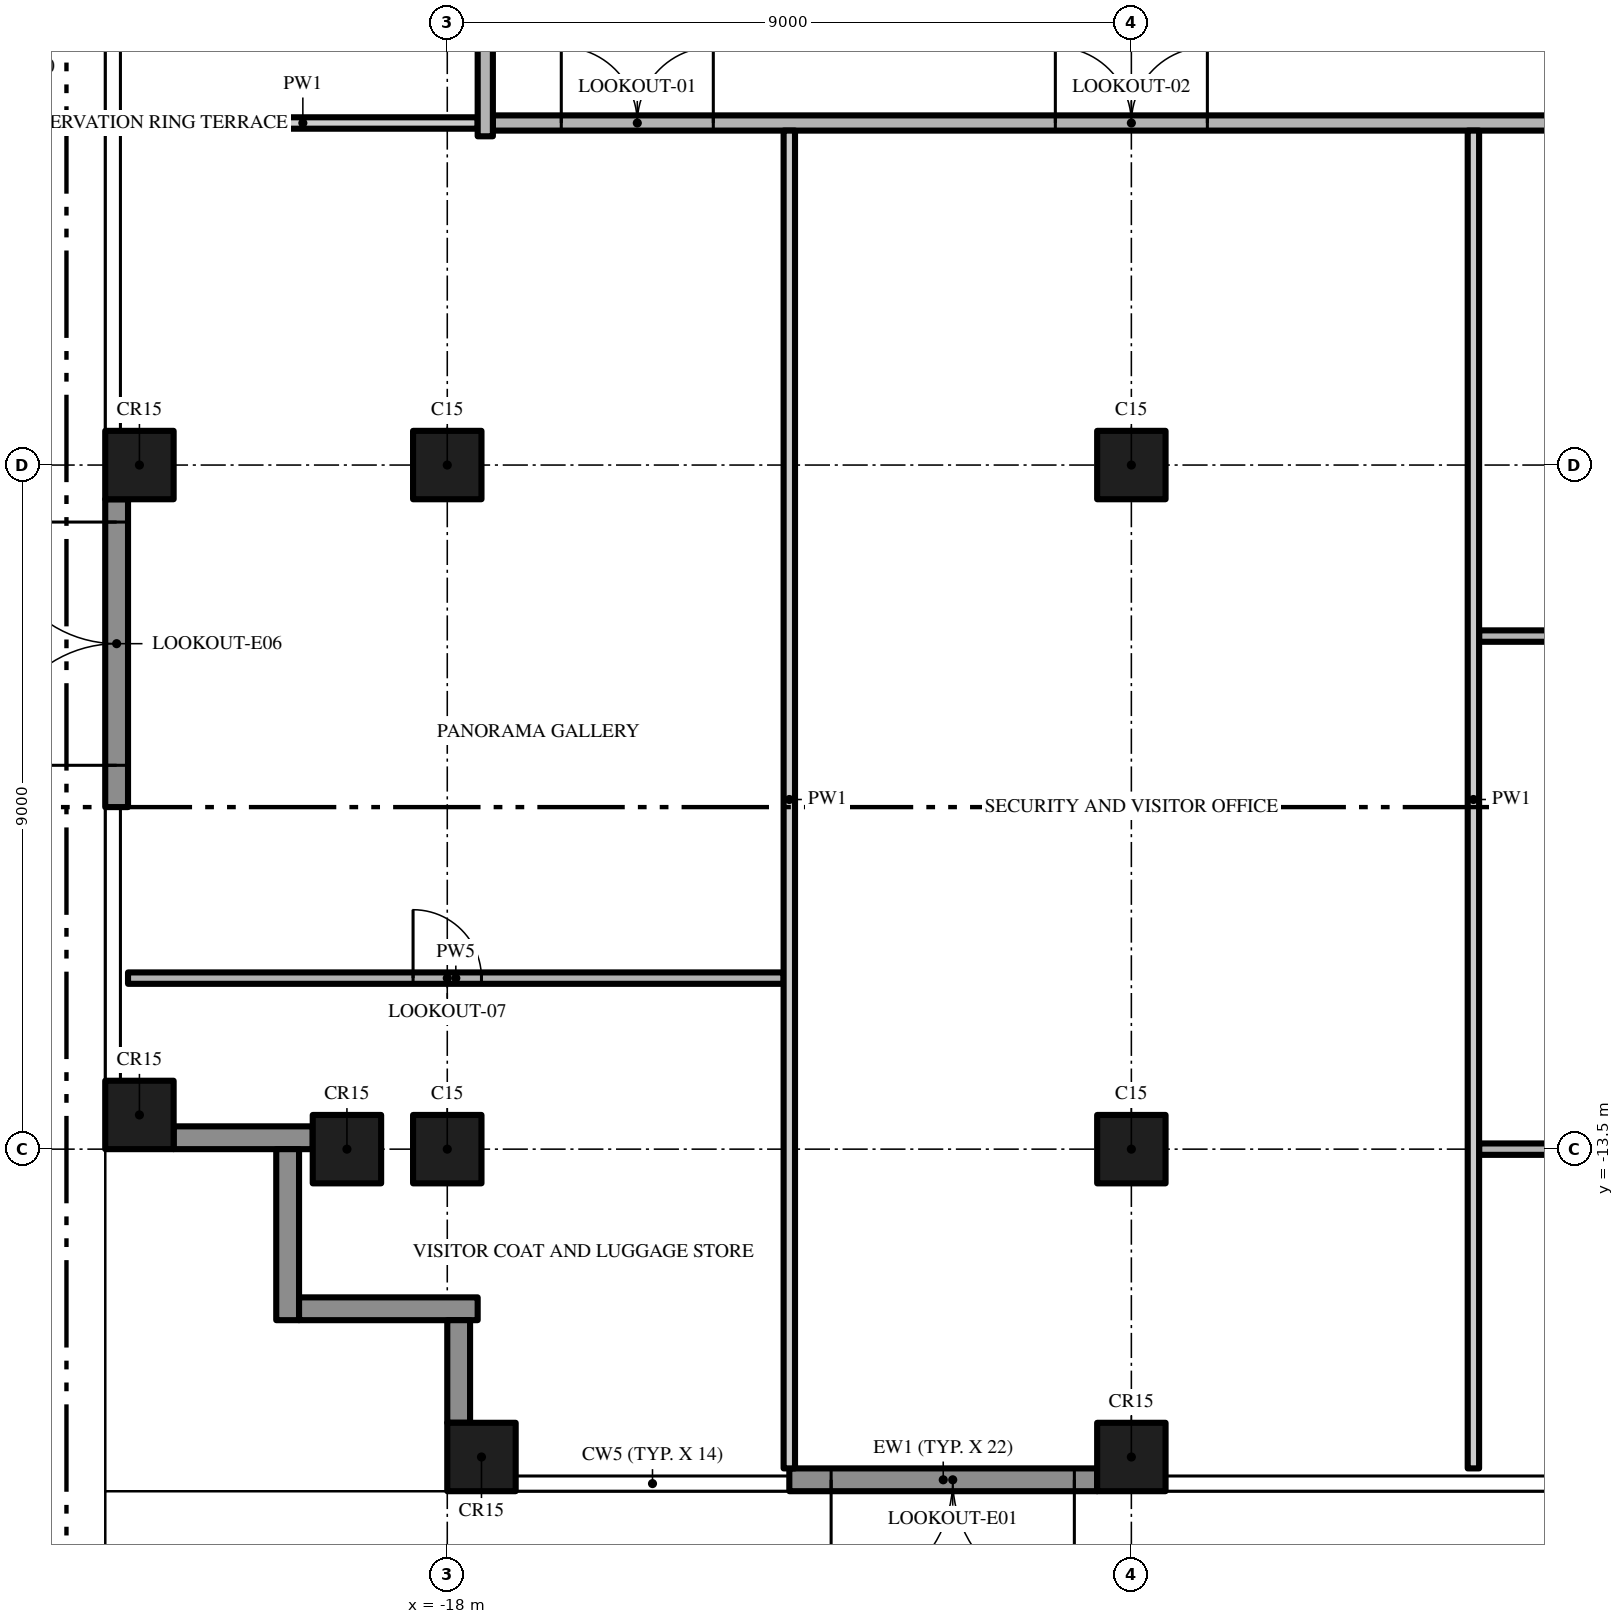
"""IFC4 building model, lengths in metres.
Left out: names, types, materials, properties, quantities, classifications, styles, units other than length and angle.
Written with IfcOpenShell. Run it as: python <this file> out.ifc"""

import sys

from ifc_helpers import new_model, si_unit, direction, frame, frame_2d, origin, origin_2d, place, context, subcontext, project, spatial, rectangle, extrude, element, fill, save


model = new_model("IFC4")
c1 = context("Model", 3, precision=1e-05, world=origin(), true_north=direction((0.0, 1.0)))
c2 = subcontext(c1, "Body", "Model", "MODEL_VIEW")
j1 = project(units=[si_unit("LENGTHUNIT", "METRE"), si_unit("PLANEANGLEUNIT", "RADIAN")], contexts=[c1])
p1 = place(None, origin())
s1 = spatial("IfcSite", under=j1, at=p1, CompositionType="ELEMENT")
p2 = place(p1, origin())
s2 = spatial("IfcBuilding", under=s1, at=p2, CompositionType="ELEMENT")
p3 = place(p2, frame((0.0, 0.0, 297.4)))
s3 = spatial("IfcBuildingStorey", under=s2, at=p3, CompositionType="ELEMENT", Elevation=297.4)
for number, where, z_axis, x_axis in (
    (1, (-18.0, -13.5, 0.0), (0.0, 0.0, 1.0), (1.0, 0.0, 0.0)),
    (2, (-17.55, -17.55, 0.0), (0.0, 0.0, 1.0), (1.0, 0.0, 0.0)),
    (3, (-18.0, -4.5, 0.0), (0.0, 0.0, 1.0), (1.0, 0.0, 0.0)),
    (4, (-22.05, -13.05, 0.0), (0.0, 0.0, 1.0), (1.0, 0.0, 0.0)),
    (5, (-19.32, -13.5, 0.0), (0.0, 0.0, 1.0), (1.0, 0.0, 0.0)),
    (6, (-22.05, -4.5, 0.0), (0.0, 0.0, 1.0), (1.0, 0.0, 0.0)),
    (7, (-9.0, -13.5, 0.0), (0.0, 0.0, 1.0), (1.0, 0.0, 0.0)),
    (8, (-9.0, -17.55, 0.0), (0.0, 0.0, 1.0), (1.0, 0.0, 0.0)),
    (9, (-9.0, -4.5, 0.0), (0.0, 0.0, 1.0), (1.0, 0.0, 0.0)),
):
    element("IfcColumn", number, at=place(p3, frame(where, z_axis=z_axis, x_axis=x_axis)), inside=s3, PredefinedType="COLUMN", context=c2, shape_type="SweptSolid", body=[
        extrude(rectangle(XDim=0.9, YDim=0.9, at=origin_2d()), origin(), (0.0, 0.0, 1.0), 5.65),
    ])
p4 = place(p3, frame((-9.45, -17.85, 0.0), z_axis=(0.0, 0.0, 1.0), x_axis=(-1.0, 0.0, 0.0)))
e10 = element("IfcWall", 10, at=p4, inside=s3, PredefinedType="SOLIDWALL", context=c2, shape_type="SweptSolid", body=[
    extrude(rectangle(XDim=4.05, YDim=0.3, at=frame_2d((2.025, 0.0))), origin(), (0.0, 0.0, 1.0), 5.65),
])
p5 = place(p4, frame((0.3, 0.0, 0.0)))
e11 = element("IfcOpeningElement", 11, at=p5, cuts=e10, PredefinedType="OPENING", context=c2, shape_type="SweptSolid", body=[
    extrude(rectangle(XDim=3.2, YDim=2.4, at=frame_2d((1.6, 1.2))), frame((0.0, 0.16, 0.0), z_axis=(0.0, -1.0, 0.0), x_axis=(1.0, 0.0, 0.0)), (0.0, 0.0, 1.0), 0.32),
])
p6 = place(p3, frame((-22.35, -9.0, 0.0), z_axis=(0.0, 0.0, 1.0), x_axis=(0.0, 1.0, 0.0)))
e12 = element("IfcWall", 12, at=p6, inside=s3, PredefinedType="SOLIDWALL", context=c2, shape_type="SweptSolid", body=[
    extrude(rectangle(XDim=4.05, YDim=0.3, at=frame_2d((2.025, 0.0))), origin(), (0.0, 0.0, 1.0), 5.65),
])
p7 = place(p6, frame((0.55, 0.0, 0.0)))
e13 = element("IfcOpeningElement", 13, at=p7, cuts=e12, PredefinedType="OPENING", context=c2, shape_type="SweptSolid", body=[
    extrude(rectangle(XDim=3.2, YDim=2.4, at=frame_2d((1.6, 1.2))), frame((0.0, 0.16, 0.0), z_axis=(0.0, -1.0, 0.0), x_axis=(1.0, 0.0, 0.0)), (0.0, 0.0, 1.0), 0.32),
])
p8 = place(p3, frame((-19.77, -13.35, 0.0), z_axis=(0.0, 0.0, 1.0), x_axis=(-1.0, 0.0, 0.0)))
e14 = element("IfcWall", 14, at=p8, inside=s3, PredefinedType="SOLIDWALL", context=c2, shape_type="SweptSolid", body=[
    extrude(rectangle(XDim=1.83, YDim=0.3, at=frame_2d((0.915, 0.0))), origin(), (0.0, 0.0, 1.0), 5.65),
])
p9 = place(p3, frame((-20.1, -15.75, 0.0), z_axis=(0.0, 0.0, 1.0), x_axis=(0.0, 1.0, 0.0)))
e15 = element("IfcWall", 15, at=p9, inside=s3, PredefinedType="SOLIDWALL", context=c2, shape_type="SweptSolid", body=[
    extrude(rectangle(XDim=2.25, YDim=0.3, at=frame_2d((1.125, 0.0))), origin(), (0.0, 0.0, 1.0), 5.65),
])
p10 = place(p3, frame((-17.6, -15.6, 0.0), z_axis=(0.0, 0.0, 1.0), x_axis=(-1.0, 0.0, 0.0)))
e16 = element("IfcWall", 16, at=p10, inside=s3, PredefinedType="SOLIDWALL", context=c2, shape_type="SweptSolid", body=[
    extrude(rectangle(XDim=2.35, YDim=0.3, at=frame_2d((1.175, 0.0))), origin(), (0.0, 0.0, 1.0), 5.65),
])
p11 = place(p3, frame((-17.85, -17.1, 0.0), z_axis=(0.0, 0.0, 1.0), x_axis=(0.0, 1.0, 0.0)))
e17 = element("IfcWall", 17, at=p11, inside=s3, PredefinedType="SOLIDWALL", context=c2, shape_type="SweptSolid", body=[
    extrude(rectangle(XDim=1.35, YDim=0.3, at=frame_2d((0.675, 0.0))), origin(), (0.0, 0.0, 1.0), 5.65),
])
p12 = place(p3, frame((-4.425, -13.5, 0.0), z_axis=(0.0, 0.0, 1.0), x_axis=(1.0, 0.0, 0.0)))
e18 = element("IfcWall", 18, at=p12, inside=s3, PredefinedType="PARTITIONING", context=c2, shape_type="SweptSolid", body=[
    extrude(rectangle(XDim=3.975, YDim=0.15, at=frame_2d((1.988, 0.0))), origin(), (0.0, 0.0, 1.0), 5.65),
])
p13 = place(p12, frame((2.85, 0.0, 0.0)))
e19 = element("IfcOpeningElement", 19, at=p13, cuts=e18, PredefinedType="OPENING", context=c2, shape_type="SweptSolid", body=[
    extrude(rectangle(XDim=0.9, YDim=2.1, at=frame_2d((0.45, 1.05))), frame((0.0, 0.085, 0.0), z_axis=(0.0, -1.0, 0.0), x_axis=(1.0, 0.0, 0.0)), (0.0, 0.0, 1.0), 0.17),
])
p14 = place(p3, frame((-22.2, -11.25, 0.0), z_axis=(0.0, 0.0, 1.0), x_axis=(1.0, 0.0, 0.0)))
e20 = element("IfcWall", 20, at=p14, inside=s3, PredefinedType="PARTITIONING", context=c2, shape_type="SweptSolid", body=[
    extrude(rectangle(XDim=8.625, YDim=0.15, at=frame_2d((4.312, 0.0))), origin(), (0.0, 0.0, 1.0), 5.65),
])
p15 = place(p14, frame((3.75, 0.0, 0.0)))
e21 = element("IfcOpeningElement", 21, at=p15, cuts=e20, PredefinedType="OPENING", context=c2, shape_type="SweptSolid", body=[
    extrude(rectangle(XDim=0.9, YDim=2.1, at=frame_2d((0.45, 1.05))), frame((0.0, 0.085, 0.0), z_axis=(0.0, -1.0, 0.0), x_axis=(1.0, 0.0, 0.0)), (0.0, 0.0, 1.0), 0.17),
])
p16 = place(p3, frame((-4.425, -6.75, 0.0), z_axis=(0.0, 0.0, 1.0), x_axis=(1.0, 0.0, 0.0)))
e22 = element("IfcWall", 22, at=p16, inside=s3, PredefinedType="PARTITIONING", context=c2, shape_type="SweptSolid", body=[
    extrude(rectangle(XDim=13.325, YDim=0.15, at=frame_2d((6.662, 0.0))), origin(), (0.0, 0.0, 1.0), 5.65),
])
p17 = place(p16, frame((2.85, 0.0, 0.0)))
e23 = element("IfcOpeningElement", 23, at=p17, cuts=e22, PredefinedType="OPENING", context=c2, shape_type="SweptSolid", body=[
    extrude(rectangle(XDim=0.9, YDim=2.1, at=frame_2d((0.45, 1.05))), frame((0.0, 0.085, 0.0), z_axis=(0.0, -1.0, 0.0), x_axis=(1.0, 0.0, 0.0)), (0.0, 0.0, 1.0), 0.17),
])
p18 = place(p16, frame((9.525, 0.0, 0.0)))
e24 = element("IfcOpeningElement", 24, at=p18, cuts=e22, PredefinedType="OPENING", context=c2, shape_type="SweptSolid", body=[
    extrude(rectangle(XDim=1.0, YDim=2.4, at=frame_2d((0.5, 1.2))), frame((0.0, 0.085, 0.0), z_axis=(0.0, -1.0, 0.0), x_axis=(1.0, 0.0, 0.0)), (0.0, 0.0, 1.0), 0.17),
])
p19 = place(p3, frame((-17.4, 0.0, 0.0), z_axis=(0.0, 0.0, 1.0), x_axis=(1.0, 0.0, 0.0)))
e25 = element("IfcWall", 25, at=p19, inside=s3, PredefinedType="PARTITIONING", context=c2, shape_type="SweptSolid", body=[
    extrude(rectangle(XDim=34.8, YDim=0.2, at=frame_2d((17.4, 0.0))), origin(), (0.0, 0.0, 1.0), 5.65),
])
p20 = place(p19, frame((0.9, 0.0, 0.0)))
e26 = element("IfcOpeningElement", 26, at=p20, cuts=e25, PredefinedType="OPENING", context=c2, shape_type="SweptSolid", body=[
    extrude(rectangle(XDim=2.0, YDim=2.4, at=frame_2d((1.0, 1.2))), frame((0.0, 0.11, 0.0), z_axis=(0.0, -1.0, 0.0), x_axis=(1.0, 0.0, 0.0)), (0.0, 0.0, 1.0), 0.22),
])
p21 = place(p19, frame((7.4, 0.0, 0.0)))
e27 = element("IfcOpeningElement", 27, at=p21, cuts=e25, PredefinedType="OPENING", context=c2, shape_type="SweptSolid", body=[
    extrude(rectangle(XDim=2.0, YDim=2.4, at=frame_2d((1.0, 1.2))), frame((0.0, 0.11, 0.0), z_axis=(0.0, -1.0, 0.0), x_axis=(1.0, 0.0, 0.0)), (0.0, 0.0, 1.0), 0.22),
])
p22 = place(p19, frame((18.65, 0.0, 0.0)))
e28 = element("IfcOpeningElement", 28, at=p22, cuts=e25, PredefinedType="OPENING", context=c2, shape_type="SweptSolid", body=[
    extrude(rectangle(XDim=2.0, YDim=2.4, at=frame_2d((1.0, 1.2))), frame((0.0, 0.11, 0.0), z_axis=(0.0, -1.0, 0.0), x_axis=(1.0, 0.0, 0.0)), (0.0, 0.0, 1.0), 0.22),
])
p23 = place(p19, frame((29.65, 0.0, 0.0)))
e29 = element("IfcOpeningElement", 29, at=p23, cuts=e25, PredefinedType="OPENING", context=c2, shape_type="SweptSolid", body=[
    extrude(rectangle(XDim=2.0, YDim=2.4, at=frame_2d((1.0, 1.2))), frame((0.0, 0.11, 0.0), z_axis=(0.0, -1.0, 0.0), x_axis=(1.0, 0.0, 0.0)), (0.0, 0.0, 1.0), 0.22),
])
p24 = place(p3, frame((-22.2, 0.0, 0.0), z_axis=(0.0, 0.0, 1.0), x_axis=(1.0, 0.0, 0.0)))
e30 = element("IfcWall", 30, at=p24, inside=s3, PredefinedType="PARTITIONING", context=c2, shape_type="SweptSolid", body=[
    extrude(rectangle(XDim=4.6, YDim=0.15, at=frame_2d((2.3, 0.0))), origin(), (0.0, 0.0, 1.0), 5.65),
])
p25 = place(p3, frame((-17.5, -0.175, 0.0), z_axis=(0.0, 0.0, 1.0), x_axis=(0.0, 1.0, 0.0)))
e31 = element("IfcWall", 31, at=p25, inside=s3, PredefinedType="PARTITIONING", context=c2, shape_type="SweptSolid", body=[
    extrude(rectangle(XDim=4.225, YDim=0.2, at=frame_2d((2.112, 0.0))), origin(), (0.0, 0.0, 1.0), 5.65),
])
for number, where, z_axis, x_axis in (
    (32, (-13.5, -17.7, 0.0), (0.0, 0.0, 1.0), (0.0, 1.0, 0.0)),
    (33, (-4.5, -17.7, 0.0), (0.0, 0.0, 1.0), (0.0, 1.0, 0.0)),
):
    element("IfcWall", number, at=place(p3, frame(where, z_axis=z_axis, x_axis=x_axis)), inside=s3, PredefinedType="PARTITIONING", context=c2, shape_type="SweptSolid", body=[
        extrude(rectangle(XDim=17.6, YDim=0.15, at=frame_2d((8.8, 0.0))), origin(), (0.0, 0.0, 1.0), 5.65),
    ])
p26 = place(p5, origin())
e34 = element("IfcDoor", 34, at=p26, inside=s3, OperationType="SINGLE_SWING_LEFT", PredefinedType="DOOR", context=c2, shape_type="SweptSolid", body=[
    extrude(rectangle(XDim=3.2, YDim=2.4, at=frame_2d((1.6, 1.2))), frame((0.0, 0.025, 0.0), z_axis=(0.0, -1.0, 0.0), x_axis=(1.0, 0.0, 0.0)), (0.0, 0.0, 1.0), 0.05),
])
fill(e11, e34)
p27 = place(p7, origin())
e35 = element("IfcDoor", 35, at=p27, inside=s3, OperationType="SINGLE_SWING_LEFT", PredefinedType="DOOR", context=c2, shape_type="SweptSolid", body=[
    extrude(rectangle(XDim=3.2, YDim=2.4, at=frame_2d((1.6, 1.2))), frame((0.0, 0.025, 0.0), z_axis=(0.0, -1.0, 0.0), x_axis=(1.0, 0.0, 0.0)), (0.0, 0.0, 1.0), 0.05),
])
fill(e13, e35)
p28 = place(p20, origin())
e36 = element("IfcDoor", 36, at=p28, inside=s3, OperationType="DOUBLE_DOOR_SINGLE_SWING", PredefinedType="DOOR", context=c2, shape_type="SweptSolid", body=[
    extrude(rectangle(XDim=2.0, YDim=2.4, at=frame_2d((1.0, 1.2))), frame((0.0, 0.025, 0.0), z_axis=(0.0, -1.0, 0.0), x_axis=(1.0, 0.0, 0.0)), (0.0, 0.0, 1.0), 0.05),
])
fill(e26, e36)
p29 = place(p21, origin())
e37 = element("IfcDoor", 37, at=p29, inside=s3, OperationType="DOUBLE_DOOR_SINGLE_SWING", PredefinedType="DOOR", context=c2, shape_type="SweptSolid", body=[
    extrude(rectangle(XDim=2.0, YDim=2.4, at=frame_2d((1.0, 1.2))), frame((0.0, 0.025, 0.0), z_axis=(0.0, -1.0, 0.0), x_axis=(1.0, 0.0, 0.0)), (0.0, 0.0, 1.0), 0.05),
])
fill(e27, e37)
p30 = place(p15, origin())
e38 = element("IfcDoor", 38, at=p30, inside=s3, OperationType="SINGLE_SWING_LEFT", PredefinedType="DOOR", context=c2, shape_type="SweptSolid", body=[
    extrude(rectangle(XDim=0.9, YDim=2.1, at=frame_2d((0.45, 1.05))), frame((0.0, 0.025, 0.0), z_axis=(0.0, -1.0, 0.0), x_axis=(1.0, 0.0, 0.0)), (0.0, 0.0, 1.0), 0.05),
])
fill(e21, e38)
save(model, sys.argv[1])
